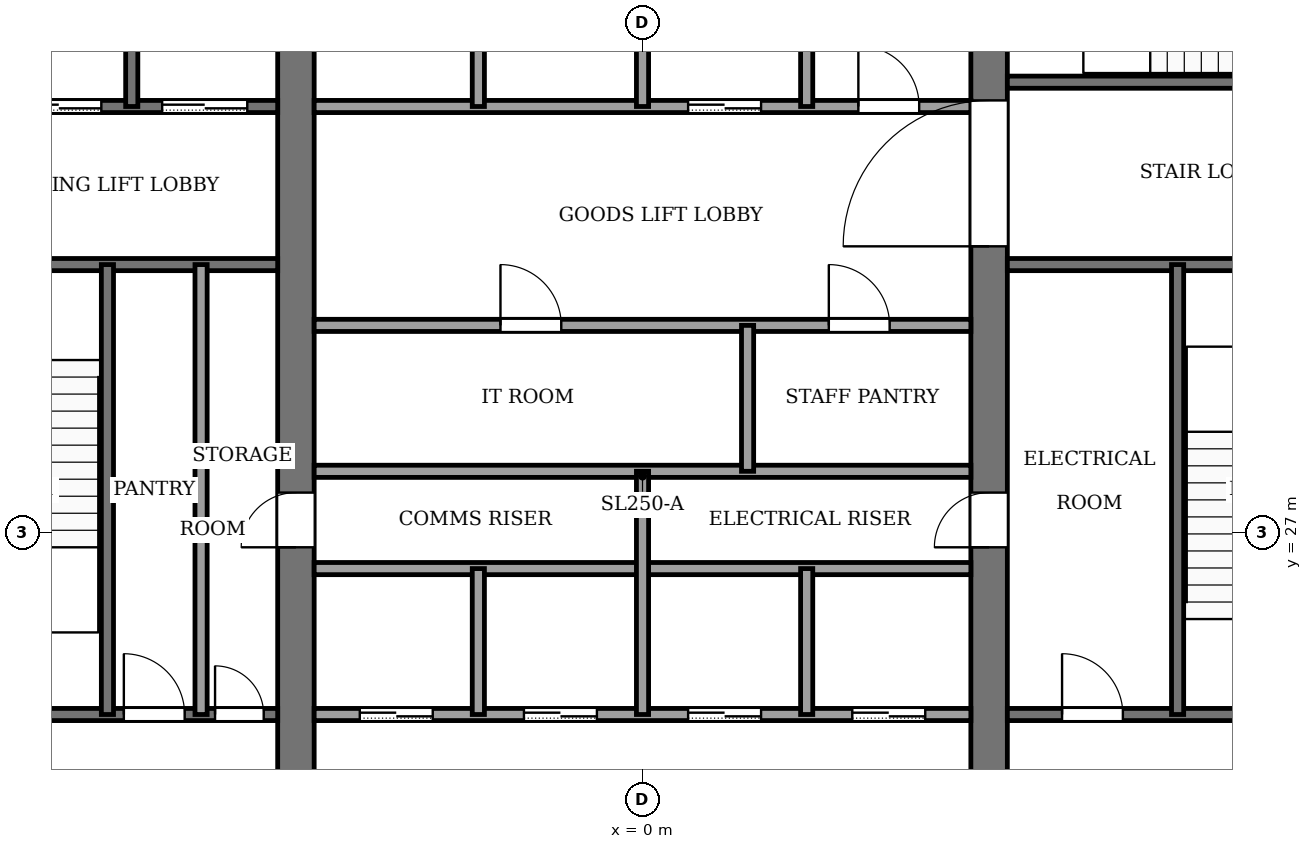
"""IFC4 building model, lengths in metres.
Left out: names, types, materials, properties, quantities, classifications, styles, units other than length and angle.
Written with IfcOpenShell. Run it as: python <this file> out.ifc"""

import sys

from ifc_helpers import new_model, si_unit, direction, frame, frame_2d, origin, place, context, subcontext, project, spatial, rectangle, extrude, element, fill, save


model = new_model("IFC4")
c1 = context("Model", 3, precision=1e-05, world=origin(), true_north=direction((0.0, 1.0)))
c2 = subcontext(c1, "Body", "Model", "MODEL_VIEW")
j1 = project(units=[si_unit("LENGTHUNIT", "METRE"), si_unit("PLANEANGLEUNIT", "RADIAN")], contexts=[c1])
p1 = place(None, origin())
s1 = spatial("IfcSite", under=j1, at=p1, CompositionType="ELEMENT")
p2 = place(p1, origin())
s2 = spatial("IfcBuilding", under=s1, at=p2, CompositionType="ELEMENT")
p3 = place(p2, frame((0.0, 0.0, 258.0)))
s3 = spatial("IfcBuildingStorey", under=s2, at=p3, CompositionType="ELEMENT", Elevation=258.0)
p4 = place(p3, frame((-5.7, 18.4, -0.13), z_axis=(0.0, 0.0, 1.0), x_axis=(0.0, 1.0, 0.0)))
e1 = element("IfcWall", 1, at=p4, inside=s3, PredefinedType="SHEAR", context=c2, shape_type="SweptSolid", body=[
    extrude(rectangle(XDim=19.2, YDim=0.6, at=frame_2d((9.6, 0.0))), origin(), (0.0, 0.0, 1.0), 4.0),
])
p5 = place(p4, frame((8.35, 0.0, 0.13)))
e2 = element("IfcOpeningElement", 2, at=p5, cuts=e1, PredefinedType="OPENING", context=c2, shape_type="SweptSolid", body=[
    extrude(rectangle(XDim=0.9, YDim=2.1, at=frame_2d((0.45, 1.05))), frame((0.0, 0.31, 0.0), z_axis=(0.0, -1.0, 0.0), x_axis=(1.0, 0.0, 0.0)), (0.0, 0.0, 1.0), 0.62),
])
p6 = place(p3, frame((5.7, 18.4, -0.13), z_axis=(0.0, 0.0, 1.0), x_axis=(0.0, 1.0, 0.0)))
e3 = element("IfcWall", 3, at=p6, inside=s3, PredefinedType="SHEAR", context=c2, shape_type="SweptSolid", body=[
    extrude(rectangle(XDim=19.2, YDim=0.6, at=frame_2d((9.6, 0.0))), origin(), (0.0, 0.0, 1.0), 4.0),
])
p7 = place(p6, frame((8.35, 0.0, 0.13)))
e4 = element("IfcOpeningElement", 4, at=p7, cuts=e3, PredefinedType="OPENING", context=c2, shape_type="SweptSolid", body=[
    extrude(rectangle(XDim=0.9, YDim=2.1, at=frame_2d((0.45, 1.05))), frame((0.0, 0.31, 0.0), z_axis=(0.0, -1.0, 0.0), x_axis=(1.0, 0.0, 0.0)), (0.0, 0.0, 1.0), 0.62),
])
p8 = place(p6, frame((13.3, 0.0, 0.13)))
e5 = element("IfcOpeningElement", 5, at=p8, cuts=e3, PredefinedType="OPENING", context=c2, shape_type="SweptSolid", body=[
    extrude(rectangle(XDim=2.4, YDim=2.4, at=frame_2d((1.2, 1.2))), frame((0.0, 0.31, 0.0), z_axis=(0.0, -1.0, 0.0), x_axis=(1.0, 0.0, 0.0)), (0.0, 0.0, 1.0), 0.62),
])
p9 = place(p3, frame((-12.6, 24.0, 0.0), z_axis=(0.0, 0.0, 1.0), x_axis=(1.0, 0.0, 0.0)))
e6 = element("IfcWall", 6, at=p9, inside=s3, PredefinedType="PARTITIONING", context=c2, shape_type="SweptSolid", body=[
    extrude(rectangle(XDim=6.6, YDim=0.2, at=frame_2d((3.3, 0.0))), origin(), (0.0, 0.0, 1.0), 3.87),
])
p10 = place(p9, frame((4.07, 0.0, 0.0)))
e7 = element("IfcOpeningElement", 7, at=p10, cuts=e6, PredefinedType="OPENING", context=c2, shape_type="SweptSolid", body=[
    extrude(rectangle(XDim=1.0, YDim=2.1, at=frame_2d((0.5, 1.05))), frame((0.0, 0.11, 0.0), z_axis=(0.0, -1.0, 0.0), x_axis=(1.0, 0.0, 0.0)), (0.0, 0.0, 1.0), 0.22),
])
p11 = place(p9, frame((5.57, 0.0, 0.0)))
e8 = element("IfcOpeningElement", 8, at=p11, cuts=e6, PredefinedType="OPENING", context=c2, shape_type="SweptSolid", body=[
    extrude(rectangle(XDim=0.8, YDim=2.1, at=frame_2d((0.4, 1.05))), frame((0.0, 0.11, 0.0), z_axis=(0.0, -1.0, 0.0), x_axis=(1.0, 0.0, 0.0)), (0.0, 0.0, 1.0), 0.22),
])
p12 = place(p3, frame((-5.4, 24.0, 0.0), z_axis=(0.0, 0.0, 1.0), x_axis=(1.0, 0.0, 0.0)))
e9 = element("IfcWall", 9, at=p12, inside=s3, PredefinedType="PARTITIONING", context=c2, shape_type="SweptSolid", body=[
    extrude(rectangle(XDim=10.8, YDim=0.2, at=frame_2d((5.4, 0.0))), origin(), (0.0, 0.0, 1.0), 3.87),
])
p13 = place(p12, frame((0.75, 0.0, 0.0)))
e10 = element("IfcOpeningElement", 10, at=p13, cuts=e9, PredefinedType="OPENING", context=c2, shape_type="SweptSolid", body=[
    extrude(rectangle(XDim=1.2, YDim=2.2, at=frame_2d((0.6, 1.1))), frame((0.0, 0.11, 0.0), z_axis=(0.0, -1.0, 0.0), x_axis=(1.0, 0.0, 0.0)), (0.0, 0.0, 1.0), 0.22),
])
p14 = place(p12, frame((3.45, 0.0, 0.0)))
e11 = element("IfcOpeningElement", 11, at=p14, cuts=e9, PredefinedType="OPENING", context=c2, shape_type="SweptSolid", body=[
    extrude(rectangle(XDim=1.2, YDim=2.2, at=frame_2d((0.6, 1.1))), frame((0.0, 0.11, 0.0), z_axis=(0.0, -1.0, 0.0), x_axis=(1.0, 0.0, 0.0)), (0.0, 0.0, 1.0), 0.22),
])
p15 = place(p12, frame((6.15, 0.0, 0.0)))
e12 = element("IfcOpeningElement", 12, at=p15, cuts=e9, PredefinedType="OPENING", context=c2, shape_type="SweptSolid", body=[
    extrude(rectangle(XDim=1.2, YDim=2.2, at=frame_2d((0.6, 1.1))), frame((0.0, 0.11, 0.0), z_axis=(0.0, -1.0, 0.0), x_axis=(1.0, 0.0, 0.0)), (0.0, 0.0, 1.0), 0.22),
])
p16 = place(p12, frame((8.85, 0.0, 0.0)))
e13 = element("IfcOpeningElement", 13, at=p16, cuts=e9, PredefinedType="OPENING", context=c2, shape_type="SweptSolid", body=[
    extrude(rectangle(XDim=1.2, YDim=2.2, at=frame_2d((0.6, 1.1))), frame((0.0, 0.11, 0.0), z_axis=(0.0, -1.0, 0.0), x_axis=(1.0, 0.0, 0.0)), (0.0, 0.0, 1.0), 0.22),
])
p17 = place(p3, frame((6.0, 24.0, 0.0), z_axis=(0.0, 0.0, 1.0), x_axis=(1.0, 0.0, 0.0)))
e14 = element("IfcWall", 14, at=p17, inside=s3, PredefinedType="PARTITIONING", context=c2, shape_type="SweptSolid", body=[
    extrude(rectangle(XDim=6.6, YDim=0.2, at=frame_2d((3.3, 0.0))), origin(), (0.0, 0.0, 1.0), 3.87),
])
p18 = place(p17, frame((0.9, 0.0, 0.0)))
e15 = element("IfcOpeningElement", 15, at=p18, cuts=e14, PredefinedType="OPENING", context=c2, shape_type="SweptSolid", body=[
    extrude(rectangle(XDim=1.0, YDim=2.1, at=frame_2d((0.5, 1.05))), frame((0.0, 0.11, 0.0), z_axis=(0.0, -1.0, 0.0), x_axis=(1.0, 0.0, 0.0)), (0.0, 0.0, 1.0), 0.22),
])
p19 = place(p17, frame((4.4, 0.0, 0.0)))
e16 = element("IfcOpeningElement", 16, at=p19, cuts=e14, PredefinedType="OPENING", context=c2, shape_type="SweptSolid", body=[
    extrude(rectangle(XDim=1.2, YDim=2.2, at=frame_2d((0.6, 1.1))), frame((0.0, 0.11, 0.0), z_axis=(0.0, -1.0, 0.0), x_axis=(1.0, 0.0, 0.0)), (0.0, 0.0, 1.0), 0.22),
])
for number, where, z_axis, x_axis in (
    (17, (-5.4, 26.4, 0.0), (0.0, 0.0, 1.0), (1.0, 0.0, 0.0)),
    (18, (-5.4, 28.0, 0.0), (0.0, 0.0, 1.0), (1.0, 0.0, 0.0)),
):
    element("IfcWall", number, at=place(p3, frame(where, z_axis=z_axis, x_axis=x_axis)), inside=s3, PredefinedType="PARTITIONING", context=c2, shape_type="SweptSolid", body=[
        extrude(rectangle(XDim=10.8, YDim=0.2, at=frame_2d((5.4, 0.0))), origin(), (0.0, 0.0, 1.0), 3.87),
    ])
p20 = place(p3, frame((-5.4, 30.4, 0.0), z_axis=(0.0, 0.0, 1.0), x_axis=(1.0, 0.0, 0.0)))
e19 = element("IfcWall", 19, at=p20, inside=s3, PredefinedType="PARTITIONING", context=c2, shape_type="SweptSolid", body=[
    extrude(rectangle(XDim=10.8, YDim=0.2, at=frame_2d((5.4, 0.0))), origin(), (0.0, 0.0, 1.0), 3.87),
])
p21 = place(p20, frame((3.064, 0.0, 0.0)))
e20 = element("IfcOpeningElement", 20, at=p21, cuts=e19, PredefinedType="OPENING", context=c2, shape_type="SweptSolid", body=[
    extrude(rectangle(XDim=1.0, YDim=2.1, at=frame_2d((0.5, 1.05))), frame((0.0, 0.11, 0.0), z_axis=(0.0, -1.0, 0.0), x_axis=(1.0, 0.0, 0.0)), (0.0, 0.0, 1.0), 0.22),
])
p22 = place(p20, frame((8.464, 0.0, 0.0)))
e21 = element("IfcOpeningElement", 21, at=p22, cuts=e19, PredefinedType="OPENING", context=c2, shape_type="SweptSolid", body=[
    extrude(rectangle(XDim=1.0, YDim=2.1, at=frame_2d((0.5, 1.05))), frame((0.0, 0.11, 0.0), z_axis=(0.0, -1.0, 0.0), x_axis=(1.0, 0.0, 0.0)), (0.0, 0.0, 1.0), 0.22),
])
p23 = place(p3, frame((-12.6, 31.4, 0.0), z_axis=(0.0, 0.0, 1.0), x_axis=(1.0, 0.0, 0.0)))
e22 = element("IfcWall", 22, at=p23, inside=s3, PredefinedType="PARTITIONING", context=c2, shape_type="SweptSolid", body=[
    extrude(rectangle(XDim=6.6, YDim=0.2, at=frame_2d((3.3, 0.0))), origin(), (0.0, 0.0, 1.0), 3.87),
])
p24 = place(p23, frame((1.0, 0.0, 0.0)))
e23 = element("IfcOpeningElement", 23, at=p24, cuts=e22, PredefinedType="OPENING", context=c2, shape_type="SweptSolid", body=[
    extrude(rectangle(XDim=1.2, YDim=2.2, at=frame_2d((0.6, 1.1))), frame((0.0, 0.11, 0.0), z_axis=(0.0, -1.0, 0.0), x_axis=(1.0, 0.0, 0.0)), (0.0, 0.0, 1.0), 0.22),
])
p25 = place(p3, frame((6.0, 31.4, 0.0), z_axis=(0.0, 0.0, 1.0), x_axis=(1.0, 0.0, 0.0)))
e24 = element("IfcWall", 24, at=p25, inside=s3, PredefinedType="PARTITIONING", context=c2, shape_type="SweptSolid", body=[
    extrude(rectangle(XDim=6.6, YDim=0.2, at=frame_2d((3.3, 0.0))), origin(), (0.0, 0.0, 1.0), 3.87),
])
p26 = place(p3, frame((-12.6, 34.0, 0.0), z_axis=(0.0, 0.0, 1.0), x_axis=(1.0, 0.0, 0.0)))
e25 = element("IfcWall", 25, at=p26, inside=s3, PredefinedType="PARTITIONING", context=c2, shape_type="SweptSolid", body=[
    extrude(rectangle(XDim=6.6, YDim=0.2, at=frame_2d((3.3, 0.0))), origin(), (0.0, 0.0, 1.0), 3.87),
])
p27 = place(p26, frame((4.7, 0.0, 0.0)))
e26 = element("IfcOpeningElement", 26, at=p27, cuts=e25, PredefinedType="OPENING", context=c2, shape_type="SweptSolid", body=[
    extrude(rectangle(XDim=1.4, YDim=2.2, at=frame_2d((0.7, 1.1))), frame((0.0, 0.11, 0.0), z_axis=(0.0, -1.0, 0.0), x_axis=(1.0, 0.0, 0.0)), (0.0, 0.0, 1.0), 0.22),
])
p28 = place(p26, frame((2.3, 0.0, 0.0)))
e27 = element("IfcOpeningElement", 27, at=p28, cuts=e25, PredefinedType="OPENING", context=c2, shape_type="SweptSolid", body=[
    extrude(rectangle(XDim=1.4, YDim=2.2, at=frame_2d((0.7, 1.1))), frame((0.0, 0.11, 0.0), z_axis=(0.0, -1.0, 0.0), x_axis=(1.0, 0.0, 0.0)), (0.0, 0.0, 1.0), 0.22),
])
p29 = place(p26, frame((0.45, 0.0, 0.0)))
e28 = element("IfcOpeningElement", 28, at=p29, cuts=e25, PredefinedType="OPENING", context=c2, shape_type="SweptSolid", body=[
    extrude(rectangle(XDim=0.9, YDim=2.1, at=frame_2d((0.45, 1.05))), frame((0.0, 0.11, 0.0), z_axis=(0.0, -1.0, 0.0), x_axis=(1.0, 0.0, 0.0)), (0.0, 0.0, 1.0), 0.22),
])
p30 = place(p3, frame((-5.4, 34.0, 0.0), z_axis=(0.0, 0.0, 1.0), x_axis=(1.0, 0.0, 0.0)))
e29 = element("IfcWall", 29, at=p30, inside=s3, PredefinedType="PARTITIONING", context=c2, shape_type="SweptSolid", body=[
    extrude(rectangle(XDim=10.8, YDim=0.2, at=frame_2d((5.4, 0.0))), origin(), (0.0, 0.0, 1.0), 3.87),
])
p31 = place(p30, frame((6.15, 0.0, 0.0)))
e30 = element("IfcOpeningElement", 30, at=p31, cuts=e29, PredefinedType="OPENING", context=c2, shape_type="SweptSolid", body=[
    extrude(rectangle(XDim=1.2, YDim=2.2, at=frame_2d((0.6, 1.1))), frame((0.0, 0.11, 0.0), z_axis=(0.0, -1.0, 0.0), x_axis=(1.0, 0.0, 0.0)), (0.0, 0.0, 1.0), 0.22),
])
p32 = place(p30, frame((8.95, 0.0, 0.0)))
e31 = element("IfcOpeningElement", 31, at=p32, cuts=e29, PredefinedType="OPENING", context=c2, shape_type="SweptSolid", body=[
    extrude(rectangle(XDim=1.0, YDim=2.1, at=frame_2d((0.5, 1.05))), frame((0.0, 0.11, 0.0), z_axis=(0.0, -1.0, 0.0), x_axis=(1.0, 0.0, 0.0)), (0.0, 0.0, 1.0), 0.22),
])
p33 = place(p3, frame((6.0, 34.4, 0.0), z_axis=(0.0, 0.0, 1.0), x_axis=(1.0, 0.0, 0.0)))
e32 = element("IfcWall", 32, at=p33, inside=s3, PredefinedType="PARTITIONING", context=c2, shape_type="SweptSolid", body=[
    extrude(rectangle(XDim=6.6, YDim=0.2, at=frame_2d((3.3, 0.0))), origin(), (0.0, 0.0, 1.0), 3.87),
])
p34 = place(p33, frame((4.8, 0.0, 0.0)))
e33 = element("IfcOpeningElement", 33, at=p34, cuts=e32, PredefinedType="OPENING", context=c2, shape_type="SweptSolid", body=[
    extrude(rectangle(XDim=1.2, YDim=2.2, at=frame_2d((0.6, 1.1))), frame((0.0, 0.11, 0.0), z_axis=(0.0, -1.0, 0.0), x_axis=(1.0, 0.0, 0.0)), (0.0, 0.0, 1.0), 0.22),
])
p35 = place(p3, frame((-8.8, 24.0, 0.0), z_axis=(0.0, 0.0, 1.0), x_axis=(0.0, 1.0, 0.0)))
e34 = element("IfcWall", 34, at=p35, inside=s3, PredefinedType="PARTITIONING", context=c2, shape_type="SweptSolid", body=[
    extrude(rectangle(XDim=7.4, YDim=0.2, at=frame_2d((3.7, 0.0))), origin(), (0.0, 0.0, 1.0), 3.87),
])
p36 = place(p3, frame((-8.4, 34.0, 0.0), z_axis=(0.0, 0.0, 1.0), x_axis=(0.0, 1.0, 0.0)))
e35 = element("IfcWall", 35, at=p36, inside=s3, PredefinedType="PARTITIONING", context=c2, shape_type="SweptSolid", body=[
    extrude(rectangle(XDim=3.6, YDim=0.2, at=frame_2d((1.8, 0.0))), origin(), (0.0, 0.0, 1.0), 3.87),
])
p37 = place(p3, frame((-7.26, 24.0, 0.0), z_axis=(0.0, 0.0, 1.0), x_axis=(0.0, 1.0, 0.0)))
e36 = element("IfcWall", 36, at=p37, inside=s3, PredefinedType="PARTITIONING", context=c2, shape_type="SweptSolid", body=[
    extrude(rectangle(XDim=7.4, YDim=0.2, at=frame_2d((3.7, 0.0))), origin(), (0.0, 0.0, 1.0), 3.87),
])
p38 = place(p3, frame((-2.7, 24.0, 0.0), z_axis=(0.0, 0.0, 1.0), x_axis=(0.0, 1.0, 0.0)))
e37 = element("IfcWall", 37, at=p38, inside=s3, PredefinedType="PARTITIONING", context=c2, shape_type="SweptSolid", body=[
    extrude(rectangle(XDim=2.4, YDim=0.2, at=frame_2d((1.2, 0.0))), origin(), (0.0, 0.0, 1.0), 3.87),
])
p39 = place(p3, frame((-2.7, 34.0, 0.0), z_axis=(0.0, 0.0, 1.0), x_axis=(0.0, 1.0, 0.0)))
e38 = element("IfcWall", 38, at=p39, inside=s3, PredefinedType="PARTITIONING", context=c2, shape_type="SweptSolid", body=[
    extrude(rectangle(XDim=3.6, YDim=0.2, at=frame_2d((1.8, 0.0))), origin(), (0.0, 0.0, 1.0), 3.87),
])
p40 = place(p3, frame((0.0, 24.0, 0.0), z_axis=(0.0, 0.0, 1.0), x_axis=(0.0, 1.0, 0.0)))
e39 = element("IfcWall", 39, at=p40, inside=s3, PredefinedType="PARTITIONING", context=c2, shape_type="SweptSolid", body=[
    extrude(rectangle(XDim=4.0, YDim=0.2, at=frame_2d((2.0, 0.0))), origin(), (0.0, 0.0, 1.0), 3.87),
])
p41 = place(p3, frame((0.0, 34.0, 0.0), z_axis=(0.0, 0.0, 1.0), x_axis=(0.0, 1.0, 0.0)))
e40 = element("IfcWall", 40, at=p41, inside=s3, PredefinedType="PARTITIONING", context=c2, shape_type="SweptSolid", body=[
    extrude(rectangle(XDim=3.6, YDim=0.2, at=frame_2d((1.8, 0.0))), origin(), (0.0, 0.0, 1.0), 3.87),
])
for number, where, z_axis, x_axis in (
    (41, (1.728, 28.0, 0.0), (0.0, 0.0, 1.0), (0.0, 1.0, 0.0)),
    (42, (2.7, 24.0, 0.0), (0.0, 0.0, 1.0), (0.0, 1.0, 0.0)),
):
    element("IfcWall", number, at=place(p3, frame(where, z_axis=z_axis, x_axis=x_axis)), inside=s3, PredefinedType="PARTITIONING", context=c2, shape_type="SweptSolid", body=[
        extrude(rectangle(XDim=2.4, YDim=0.2, at=frame_2d((1.2, 0.0))), origin(), (0.0, 0.0, 1.0), 3.87),
    ])
p42 = place(p3, frame((2.7, 34.0, 0.0), z_axis=(0.0, 0.0, 1.0), x_axis=(0.0, 1.0, 0.0)))
e43 = element("IfcWall", 43, at=p42, inside=s3, PredefinedType="PARTITIONING", context=c2, shape_type="SweptSolid", body=[
    extrude(rectangle(XDim=3.6, YDim=0.2, at=frame_2d((1.8, 0.0))), origin(), (0.0, 0.0, 1.0), 3.87),
])
p43 = place(p3, frame((8.8, 24.0, 0.0), z_axis=(0.0, 0.0, 1.0), x_axis=(0.0, 1.0, 0.0)))
e44 = element("IfcWall", 44, at=p43, inside=s3, PredefinedType="PARTITIONING", context=c2, shape_type="SweptSolid", body=[
    extrude(rectangle(XDim=7.4, YDim=0.2, at=frame_2d((3.7, 0.0))), origin(), (0.0, 0.0, 1.0), 3.87),
])
p44 = place(p13, origin())
e45 = element("IfcDoor", 45, at=p44, inside=s3, OperationType="SLIDING_TO_LEFT", PredefinedType="DOOR", context=c2, shape_type="SweptSolid", body=[
    extrude(rectangle(XDim=1.2, YDim=2.2, at=frame_2d((0.6, 1.1))), frame((0.0, 0.025, 0.0), z_axis=(0.0, -1.0, 0.0), x_axis=(1.0, 0.0, 0.0)), (0.0, 0.0, 1.0), 0.05),
])
fill(e10, e45)
p45 = place(p14, origin())
e46 = element("IfcDoor", 46, at=p45, inside=s3, OperationType="SLIDING_TO_LEFT", PredefinedType="DOOR", context=c2, shape_type="SweptSolid", body=[
    extrude(rectangle(XDim=1.2, YDim=2.2, at=frame_2d((0.6, 1.1))), frame((0.0, 0.025, 0.0), z_axis=(0.0, -1.0, 0.0), x_axis=(1.0, 0.0, 0.0)), (0.0, 0.0, 1.0), 0.05),
])
fill(e11, e46)
p46 = place(p15, origin())
e47 = element("IfcDoor", 47, at=p46, inside=s3, OperationType="SLIDING_TO_LEFT", PredefinedType="DOOR", context=c2, shape_type="SweptSolid", body=[
    extrude(rectangle(XDim=1.2, YDim=2.2, at=frame_2d((0.6, 1.1))), frame((0.0, 0.025, 0.0), z_axis=(0.0, -1.0, 0.0), x_axis=(1.0, 0.0, 0.0)), (0.0, 0.0, 1.0), 0.05),
])
fill(e12, e47)
p47 = place(p16, origin())
e48 = element("IfcDoor", 48, at=p47, inside=s3, OperationType="SLIDING_TO_LEFT", PredefinedType="DOOR", context=c2, shape_type="SweptSolid", body=[
    extrude(rectangle(XDim=1.2, YDim=2.2, at=frame_2d((0.6, 1.1))), frame((0.0, 0.025, 0.0), z_axis=(0.0, -1.0, 0.0), x_axis=(1.0, 0.0, 0.0)), (0.0, 0.0, 1.0), 0.05),
])
fill(e13, e48)
p48 = place(p31, origin())
e49 = element("IfcDoor", 49, at=p48, inside=s3, OperationType="SLIDING_TO_LEFT", PredefinedType="DOOR", context=c2, shape_type="SweptSolid", body=[
    extrude(rectangle(XDim=1.2, YDim=2.2, at=frame_2d((0.6, 1.1))), frame((0.0, 0.025, 0.0), z_axis=(0.0, -1.0, 0.0), x_axis=(1.0, 0.0, 0.0)), (0.0, 0.0, 1.0), 0.05),
])
fill(e30, e49)
p49 = place(p27, origin())
e50 = element("IfcDoor", 50, at=p49, inside=s3, OperationType="SLIDING_TO_LEFT", PredefinedType="DOOR", context=c2, shape_type="SweptSolid", body=[
    extrude(rectangle(XDim=1.4, YDim=2.2, at=frame_2d((0.7, 1.1))), frame((0.0, 0.025, 0.0), z_axis=(0.0, -1.0, 0.0), x_axis=(1.0, 0.0, 0.0)), (0.0, 0.0, 1.0), 0.05),
])
fill(e26, e50)
p50 = place(p28, origin())
e51 = element("IfcDoor", 51, at=p50, inside=s3, OperationType="SLIDING_TO_LEFT", PredefinedType="DOOR", context=c2, shape_type="SweptSolid", body=[
    extrude(rectangle(XDim=1.4, YDim=2.2, at=frame_2d((0.7, 1.1))), frame((0.0, 0.025, 0.0), z_axis=(0.0, -1.0, 0.0), x_axis=(1.0, 0.0, 0.0)), (0.0, 0.0, 1.0), 0.05),
])
fill(e27, e51)
p51 = place(p21, origin())
e52 = element("IfcDoor", 52, at=p51, inside=s3, OperationType="SINGLE_SWING_RIGHT", PredefinedType="DOOR", context=c2, shape_type="SweptSolid", body=[
    extrude(rectangle(XDim=1.0, YDim=2.1, at=frame_2d((0.5, 1.05))), frame((0.0, 0.025, 0.0), z_axis=(0.0, -1.0, 0.0), x_axis=(1.0, 0.0, 0.0)), (0.0, 0.0, 1.0), 0.05),
])
fill(e20, e52)
p52 = place(p22, origin())
e53 = element("IfcDoor", 53, at=p52, inside=s3, OperationType="SINGLE_SWING_LEFT", PredefinedType="DOOR", context=c2, shape_type="SweptSolid", body=[
    extrude(rectangle(XDim=1.0, YDim=2.1, at=frame_2d((0.5, 1.05))), frame((0.0, 0.025, 0.0), z_axis=(0.0, -1.0, 0.0), x_axis=(1.0, 0.0, 0.0)), (0.0, 0.0, 1.0), 0.05),
])
fill(e21, e53)
p53 = place(p10, origin())
e54 = element("IfcDoor", 54, at=p53, inside=s3, OperationType="SINGLE_SWING_RIGHT", PredefinedType="DOOR", context=c2, shape_type="SweptSolid", body=[
    extrude(rectangle(XDim=1.0, YDim=2.1, at=frame_2d((0.5, 1.05))), frame((0.0, 0.025, 0.0), z_axis=(0.0, -1.0, 0.0), x_axis=(1.0, 0.0, 0.0)), (0.0, 0.0, 1.0), 0.05),
])
fill(e7, e54)
p54 = place(p11, origin())
e55 = element("IfcDoor", 55, at=p54, inside=s3, OperationType="SINGLE_SWING_LEFT", PredefinedType="DOOR", context=c2, shape_type="SweptSolid", body=[
    extrude(rectangle(XDim=0.8, YDim=2.1, at=frame_2d((0.4, 1.05))), frame((0.0, 0.025, 0.0), z_axis=(0.0, -1.0, 0.0), x_axis=(1.0, 0.0, 0.0)), (0.0, 0.0, 1.0), 0.05),
])
fill(e8, e55)
p55 = place(p18, origin())
e56 = element("IfcDoor", 56, at=p55, inside=s3, OperationType="SINGLE_SWING_RIGHT", PredefinedType="DOOR", context=c2, shape_type="SweptSolid", body=[
    extrude(rectangle(XDim=1.0, YDim=2.1, at=frame_2d((0.5, 1.05))), frame((0.0, 0.025, 0.0), z_axis=(0.0, -1.0, 0.0), x_axis=(1.0, 0.0, 0.0)), (0.0, 0.0, 1.0), 0.05),
])
fill(e15, e56)
p56 = place(p32, origin())
e57 = element("IfcDoor", 57, at=p56, inside=s3, OperationType="SINGLE_SWING_LEFT", PredefinedType="DOOR", context=c2, shape_type="SweptSolid", body=[
    extrude(rectangle(XDim=1.0, YDim=2.1, at=frame_2d((0.5, 1.05))), frame((0.0, 0.025, 0.0), z_axis=(0.0, -1.0, 0.0), x_axis=(1.0, 0.0, 0.0)), (0.0, 0.0, 1.0), 0.05),
])
fill(e31, e57)
p57 = place(p5, origin())
e58 = element("IfcDoor", 58, at=p57, inside=s3, OperationType="SINGLE_SWING_LEFT", PredefinedType="DOOR", context=c2, shape_type="SweptSolid", body=[
    extrude(rectangle(XDim=0.9, YDim=2.1, at=frame_2d((0.45, 1.05))), frame((0.0, 0.025, 0.0), z_axis=(0.0, -1.0, 0.0), x_axis=(1.0, 0.0, 0.0)), (0.0, 0.0, 1.0), 0.05),
])
fill(e2, e58)
p58 = place(p7, origin())
e59 = element("IfcDoor", 59, at=p58, inside=s3, OperationType="SINGLE_SWING_RIGHT", PredefinedType="DOOR", context=c2, shape_type="SweptSolid", body=[
    extrude(rectangle(XDim=0.9, YDim=2.1, at=frame_2d((0.45, 1.05))), frame((0.0, 0.025, 0.0), z_axis=(0.0, -1.0, 0.0), x_axis=(1.0, 0.0, 0.0)), (0.0, 0.0, 1.0), 0.05),
])
fill(e4, e59)
p59 = place(p8, origin())
e60 = element("IfcDoor", 60, at=p59, inside=s3, OperationType="DOUBLE_DOOR_SINGLE_SWING", PredefinedType="DOOR", context=c2, shape_type="SweptSolid", body=[
    extrude(rectangle(XDim=2.4, YDim=2.4, at=frame_2d((1.2, 1.2))), frame((0.0, 0.025, 0.0), z_axis=(0.0, -1.0, 0.0), x_axis=(1.0, 0.0, 0.0)), (0.0, 0.0, 1.0), 0.05),
])
fill(e5, e60)
save(model, sys.argv[1])
